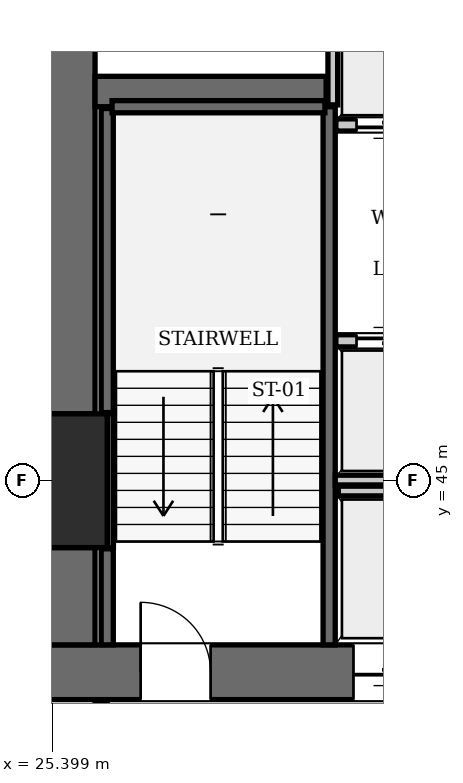
"""IFC4 building model, lengths in metres.
Left out: names, types, materials, properties, quantities, classifications, styles, units other than length and angle.
Written with IfcOpenShell. Run it as: python <this file> out.ifc"""

import sys

from ifc_helpers import new_model, si_unit, direction, frame, frame_2d, origin, origin_2d, place, context, subcontext, project, spatial, rectangle, extrude, element, fill, save


model = new_model("IFC4")
c1 = context("Model", 3, precision=1e-05, world=origin(), true_north=direction((0.0, 1.0)))
c2 = subcontext(c1, "Body", "Model", "MODEL_VIEW")
j1 = project(units=[si_unit("LENGTHUNIT", "METRE"), si_unit("PLANEANGLEUNIT", "RADIAN")], contexts=[c1])
p1 = place(None, origin())
s1 = spatial("IfcSite", under=j1, at=p1, CompositionType="ELEMENT")
p2 = place(p1, origin())
s2 = spatial("IfcBuilding", under=s1, at=p2, CompositionType="ELEMENT")
p3 = place(p2, frame((0.0, 0.0, 57.75)))
s3 = spatial("IfcBuildingStorey", under=s2, at=p3, CompositionType="ELEMENT", Elevation=57.75)
p4 = place(p3, frame((25.2, 45.0, 0.0), z_axis=(0.0, 0.0, 1.0), x_axis=(1.0, 0.0, 0.0)))
e1 = element("IfcColumn", 1, at=p4, inside=s3, PredefinedType="COLUMN", context=c2, shape_type="SweptSolid", body=[
    extrude(rectangle(XDim=2.2, YDim=2.2, at=origin_2d()), origin(), (0.0, 0.0, 1.0), 3.85),
])
p5 = place(p3, frame((25.2, 41.85, 0.0), z_axis=(0.0, 0.0, 1.0), x_axis=(1.0, 0.0, 0.0)))
e2 = element("IfcWall", 2, at=p5, inside=s3, PredefinedType="SHEAR", context=c2, shape_type="SweptSolid", body=[
    extrude(rectangle(XDim=6.8, YDim=0.9, at=frame_2d((3.4, 0.0))), origin(), (0.0, 0.0, 1.0), 3.85),
])
p6 = place(p5, frame((1.65, 0.0, 0.0)))
e3 = element("IfcOpeningElement", 3, at=p6, cuts=e2, PredefinedType="OPENING", context=c2, shape_type="SweptSolid", body=[
    extrude(rectangle(XDim=1.15, YDim=2.15, at=frame_2d((0.575, 1.075))), frame((0.0, 0.46, 0.0), z_axis=(0.0, -1.0, 0.0), x_axis=(1.0, 0.0, 0.0)), (0.0, 0.0, 1.0), 0.92),
])
p7 = place(p5, frame((5.15, 0.0, 0.0)))
e4 = element("IfcOpeningElement", 4, at=p7, cuts=e2, PredefinedType="OPENING", context=c2, shape_type="SweptSolid", body=[
    extrude(rectangle(XDim=1.1, YDim=2.2, at=frame_2d((0.55, 1.1))), frame((0.0, 0.46, 0.0), z_axis=(0.0, -1.0, 0.0), x_axis=(1.0, 0.0, 0.0)), (0.0, 0.0, 1.0), 0.92),
])
p8 = place(p3, frame((25.65, 42.3, 0.0), z_axis=(0.0, 0.0, 1.0), x_axis=(0.0, 1.0, 0.0)))
e5 = element("IfcWall", 5, at=p8, inside=s3, PredefinedType="SHEAR", context=c2, shape_type="SweptSolid", body=[
    extrude(rectangle(XDim=1.6, YDim=0.9, at=frame_2d((0.8, 0.0))), origin(), (0.0, 0.0, 1.0), 3.85),
])
p9 = place(p3, frame((25.65, 46.1, 0.0), z_axis=(0.0, 0.0, 1.0), x_axis=(0.0, 1.0, 0.0)))
e6 = element("IfcWall", 6, at=p9, inside=s3, PredefinedType="SHEAR", context=c2, shape_type="SweptSolid", body=[
    extrude(rectangle(XDim=7.0, YDim=0.9, at=frame_2d((3.5, 0.0))), origin(), (0.0, 0.0, 1.0), 3.85),
])
p10 = place(p3, frame((26.1, 51.4, 0.0), z_axis=(0.0, 0.0, 1.0), x_axis=(1.0, 0.0, 0.0)))
e7 = element("IfcWall", 7, at=p10, inside=s3, PredefinedType="SHEAR", context=c2, shape_type="SweptSolid", body=[
    extrude(rectangle(XDim=3.8, YDim=0.5, at=frame_2d((1.9, 0.0))), origin(), (0.0, 0.0, 1.0), 3.85),
])
p11 = place(p3, frame((29.95, 42.3, 0.0), z_axis=(0.0, 0.0, 1.0), x_axis=(0.0, 1.0, 0.0)))
e8 = element("IfcWall", 8, at=p11, inside=s3, PredefinedType="SOLIDWALL", context=c2, shape_type="SweptSolid", body=[
    extrude(rectangle(XDim=8.85, YDim=0.2, at=frame_2d((4.425, 0.0))), origin(), (0.0, 0.0, 1.0), 3.61),
])
p12 = place(p3, frame((26.3, 42.3, 0.0), z_axis=(0.0, 0.0, 1.0), x_axis=(0.0, 1.0, 0.0)))
e9 = element("IfcWall", 9, at=p12, inside=s3, PredefinedType="SOLIDWALL", context=c2, shape_type="SweptSolid", body=[
    extrude(rectangle(XDim=1.58, YDim=0.2, at=frame_2d((0.79, 0.0))), origin(), (0.0, 0.0, 1.0), 3.61),
])
p13 = place(p3, frame((26.3, 46.12, 0.0), z_axis=(0.0, 0.0, 1.0), x_axis=(0.0, 1.0, 0.0)))
e10 = element("IfcWall", 10, at=p13, inside=s3, PredefinedType="SOLIDWALL", context=c2, shape_type="SweptSolid", body=[
    extrude(rectangle(XDim=5.0, YDim=0.2, at=frame_2d((2.5, 0.0))), origin(), (0.0, 0.0, 1.0), 3.61),
])
p14 = place(p3, frame((26.38, 51.15, 0.0), z_axis=(0.0, 0.0, 1.0), x_axis=(1.0, 0.0, 0.0)))
e11 = element("IfcWall", 11, at=p14, inside=s3, PredefinedType="SOLIDWALL", context=c2, shape_type="SweptSolid", body=[
    extrude(rectangle(XDim=3.5, YDim=0.2, at=frame_2d((1.75, 0.0))), origin(), (0.0, 0.0, 1.0), 3.61),
])
p15 = place(p3, frame((26.352, 43.9, 0.0), z_axis=(0.0, 0.0, 1.0), x_axis=(0.0, 1.0, 0.0)))
e12 = element("IfcWall", 12, at=p15, inside=s3, PredefinedType="SOLIDWALL", context=c2, shape_type="SweptSolid", body=[
    extrude(rectangle(XDim=2.2, YDim=0.1, at=frame_2d((1.1, 0.0))), origin(), (0.0, 0.0, 1.0), 3.61),
])
p16 = place(p3, frame((30.06, 47.3, 0.0), z_axis=(0.0, 0.0, 1.0), x_axis=(1.0, 0.0, 0.0)))
e13 = element("IfcWall", 13, at=p16, inside=s3, PredefinedType="SOLIDWALL", context=c2, shape_type="SweptSolid", body=[
    extrude(rectangle(XDim=1.68, YDim=0.2, at=frame_2d((0.84, 0.0))), origin(), (0.0, 0.0, 1.0), 3.61),
])
p17 = place(p16, frame((0.34, 0.0, 0.0)))
e14 = element("IfcOpeningElement", 14, at=p17, cuts=e13, PredefinedType="OPENING", context=c2, shape_type="SweptSolid", body=[
    extrude(rectangle(XDim=1.0, YDim=2.15, at=frame_2d((0.5, 1.075))), frame((0.0, 0.11, 0.0), z_axis=(0.0, -1.0, 0.0), x_axis=(1.0, 0.0, 0.0)), (0.0, 0.0, 1.0), 0.22),
])
p18 = place(p3, frame((30.06, 50.85, 0.0), z_axis=(0.0, 0.0, 1.0), x_axis=(1.0, 0.0, 0.0)))
e15 = element("IfcWall", 15, at=p18, inside=s3, PredefinedType="SOLIDWALL", context=c2, shape_type="SweptSolid", body=[
    extrude(rectangle(XDim=1.68, YDim=0.2, at=frame_2d((0.84, 0.0))), origin(), (0.0, 0.0, 1.0), 3.61),
])
p19 = place(p18, frame((0.34, 0.0, 0.0)))
e16 = element("IfcOpeningElement", 16, at=p19, cuts=e15, PredefinedType="OPENING", context=c2, shape_type="SweptSolid", body=[
    extrude(rectangle(XDim=1.0, YDim=2.15, at=frame_2d((0.5, 1.075))), frame((0.0, 0.11, 0.0), z_axis=(0.0, -1.0, 0.0), x_axis=(1.0, 0.0, 0.0)), (0.0, 0.0, 1.0), 0.22),
])
p20 = place(p3, frame((30.1, 44.83, 0.0), z_axis=(0.0, 0.0, 1.0), x_axis=(1.0, 0.0, 0.0)))
e17 = element("IfcWall", 17, at=p20, inside=s3, PredefinedType="SOLIDWALL", context=c2, shape_type="SweptSolid", body=[
    extrude(rectangle(XDim=1.6, YDim=0.16, at=frame_2d((0.8, 0.0))), origin(), (0.0, 0.0, 1.0), 3.61),
])
p21 = place(p3, frame((30.05, 45.01, 0.0), z_axis=(0.0, 0.0, 1.0), x_axis=(1.0, 0.0, 0.0)))
e18 = element("IfcWall", 18, at=p21, inside=s3, PredefinedType="SOLIDWALL", context=c2, shape_type="SweptSolid", body=[
    extrude(rectangle(XDim=3.45, YDim=0.16, at=frame_2d((1.725, 0.0))), origin(), (0.0, 0.0, 1.0), 3.61),
])
p22 = place(p3, frame((30.01, 51.18, 0.0), z_axis=(0.0, 0.0, 1.0), x_axis=(0.0, 1.0, 0.0)))
e19 = element("IfcWall", 19, at=p22, inside=s3, PredefinedType="SOLIDWALL", context=c2, shape_type="SweptSolid", body=[
    extrude(rectangle(XDim=1.92, YDim=0.16, at=frame_2d((0.96, 0.0))), origin(), (0.0, 0.0, 1.0), 3.61),
])
p23 = place(p3, frame((26.2, 38.31, 0.0), z_axis=(0.0, 0.0, 1.0), x_axis=(0.0, 1.0, 0.0)))
e20 = element("IfcWall", 20, at=p23, inside=s3, PredefinedType="PARTITIONING", context=c2, shape_type="SweptSolid", body=[
    extrude(rectangle(XDim=3.07, YDim=0.2, at=frame_2d((1.535, 0.0))), origin(), (0.0, 0.0, 1.0), 3.61),
])
p24 = place(p6, origin())
e21 = element("IfcDoor", 21, at=p24, inside=s3, OperationType="SINGLE_SWING_LEFT", PredefinedType="DOOR", context=c2, shape_type="SweptSolid", body=[
    extrude(rectangle(XDim=1.15, YDim=2.15, at=frame_2d((0.575, 1.075))), frame((0.0, 0.025, 0.0), z_axis=(0.0, -1.0, 0.0), x_axis=(1.0, 0.0, 0.0)), (0.0, 0.0, 1.0), 0.05),
])
fill(e3, e21)
p25 = place(p17, origin())
e22 = element("IfcDoor", 22, at=p25, inside=s3, OperationType="SLIDING_TO_LEFT", PredefinedType="DOOR", context=c2, shape_type="SweptSolid", body=[
    extrude(rectangle(XDim=1.0, YDim=2.15, at=frame_2d((0.5, 1.075))), frame((0.0, 0.025, 0.0), z_axis=(0.0, -1.0, 0.0), x_axis=(1.0, 0.0, 0.0)), (0.0, 0.0, 1.0), 0.05),
])
fill(e14, e22)
p26 = place(p19, frame((1.0, 0.0, 0.0), z_axis=(0.0, 0.0, 1.0), x_axis=(-1.0, 0.0, 0.0)))
e23 = element("IfcDoor", 23, at=p26, inside=s3, OperationType="SLIDING_TO_LEFT", PredefinedType="DOOR", context=c2, shape_type="SweptSolid", body=[
    extrude(rectangle(XDim=1.0, YDim=2.15, at=frame_2d((0.5, 1.075))), frame((0.0, 0.025, 0.0), z_axis=(0.0, -1.0, 0.0), x_axis=(1.0, 0.0, 0.0)), (0.0, 0.0, 1.0), 0.05),
])
fill(e16, e23)
p27 = place(p7, frame((1.1, 0.0, 0.0), z_axis=(0.0, 0.0, 1.0), x_axis=(-1.0, 0.0, 0.0)))
e24 = element("IfcDoor", 24, at=p27, inside=s3, OperationType="SLIDING_TO_LEFT", PredefinedType="DOOR", context=c2, shape_type="SweptSolid", body=[
    extrude(rectangle(XDim=1.1, YDim=2.2, at=frame_2d((0.55, 1.1))), frame((0.0, 0.025, 0.0), z_axis=(0.0, -1.0, 0.0), x_axis=(1.0, 0.0, 0.0)), (0.0, 0.0, 1.0), 0.05),
])
fill(e4, e24)
save(model, sys.argv[1])
